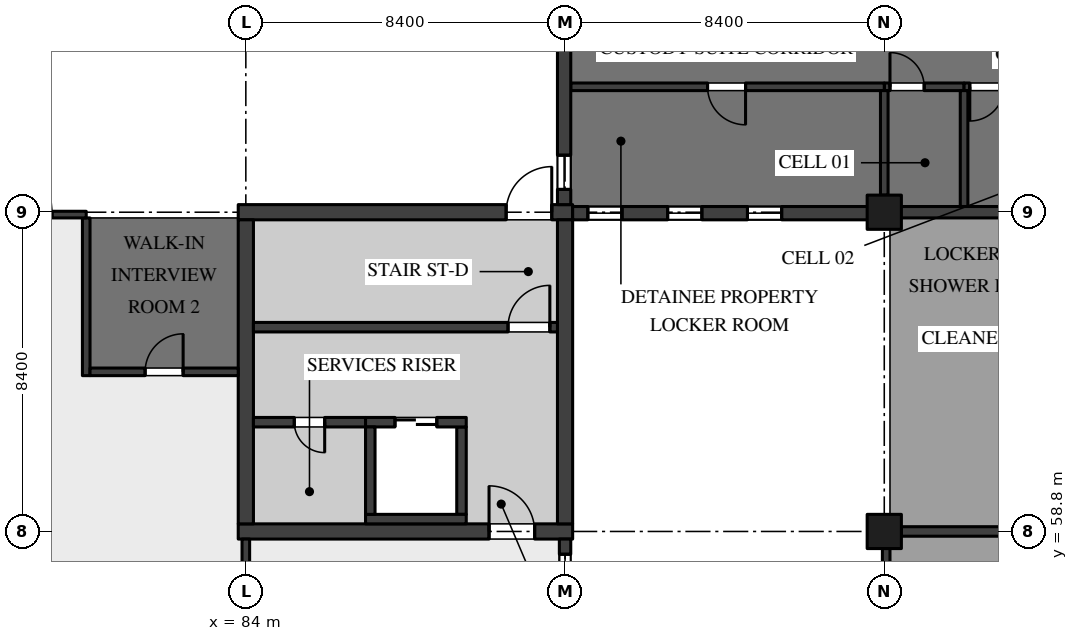
"""IFC4 building model, lengths in metres.
Left out: names, types, materials, properties, quantities, classifications, styles, units other than length and angle.
Written with IfcOpenShell. Run it as: python <this file> out.ifc"""

import sys

from ifc_helpers import new_model, si_unit, direction, frame, frame_2d, origin, origin_2d, place, context, subcontext, project, spatial, rectangle, extrude, element, fill, save


model = new_model("IFC4")
c1 = context("Model", 3, precision=1e-05, world=origin(), true_north=direction((0.0, 1.0)))
c2 = subcontext(c1, "Body", "Model", "MODEL_VIEW")
j1 = project(units=[si_unit("LENGTHUNIT", "METRE"), si_unit("PLANEANGLEUNIT", "RADIAN")], contexts=[c1])
p1 = place(None, origin())
s1 = spatial("IfcSite", under=j1, at=p1, CompositionType="ELEMENT")
p2 = place(p1, origin())
s2 = spatial("IfcBuilding", under=s1, at=p2, CompositionType="ELEMENT")
p3 = place(p2, origin())
s3 = spatial("IfcBuildingStorey", under=s2, at=p3, CompositionType="ELEMENT", Elevation=0.0)
for number, where, z_axis, x_axis in (
    (1, (100.8, 58.8, 0.0), (0.0, 0.0, 1.0), (1.0, 0.0, 0.0)),
    (2, (100.8, 67.2, 0.0), (0.0, 0.0, 1.0), (1.0, 0.0, 0.0)),
):
    element("IfcColumn", number, at=place(p3, frame(where, z_axis=z_axis, x_axis=x_axis)), inside=s3, PredefinedType="COLUMN", context=c2, shape_type="SweptSolid", body=[
        extrude(rectangle(XDim=0.9, YDim=0.9, at=origin_2d()), origin(), (0.0, 0.0, 1.0), 5.05),
    ])
p4 = place(p3, frame((83.8, 58.8, 0.0), z_axis=(0.0, 0.0, 1.0), x_axis=(1.0, 0.0, 0.0)))
e3 = element("IfcWall", 3, at=p4, inside=s3, PredefinedType="SHEAR", context=c2, shape_type="SweptSolid", body=[
    extrude(rectangle(XDim=8.8, YDim=0.4, at=frame_2d((4.4, 0.0))), origin(), (0.0, 0.0, 1.0), 5.05),
])
p5 = place(p4, frame((6.6, 0.0, 0.0)))
e4 = element("IfcOpeningElement", 4, at=p5, cuts=e3, PredefinedType="OPENING", context=c2, shape_type="SweptSolid", body=[
    extrude(rectangle(XDim=1.2, YDim=2.1, at=frame_2d((0.6, 1.05))), frame((0.0, 0.21, 0.0), z_axis=(0.0, -1.0, 0.0), x_axis=(1.0, 0.0, 0.0)), (0.0, 0.0, 1.0), 0.42),
])
p6 = place(p3, frame((83.8, 67.2, 0.0), z_axis=(0.0, 0.0, 1.0), x_axis=(1.0, 0.0, 0.0)))
e5 = element("IfcWall", 5, at=p6, inside=s3, PredefinedType="SHEAR", context=c2, shape_type="SweptSolid", body=[
    extrude(rectangle(XDim=8.8, YDim=0.4, at=frame_2d((4.4, 0.0))), origin(), (0.0, 0.0, 1.0), 5.05),
])
p7 = place(p6, frame((7.05, 0.0, 0.0)))
e6 = element("IfcOpeningElement", 6, at=p7, cuts=e5, PredefinedType="OPENING", context=c2, shape_type="SweptSolid", body=[
    extrude(rectangle(XDim=1.2, YDim=2.1, at=frame_2d((0.6, 1.05))), frame((0.0, 0.21, 0.0), z_axis=(0.0, -1.0, 0.0), x_axis=(1.0, 0.0, 0.0)), (0.0, 0.0, 1.0), 0.42),
])
for number, where, z_axis, x_axis in (
    (7, (84.0, 59.0, 0.0), (0.0, 0.0, 1.0), (0.0, 1.0, 0.0)),
    (8, (92.4, 59.0, 0.0), (0.0, 0.0, 1.0), (0.0, 1.0, 0.0)),
):
    element("IfcWall", number, at=place(p3, frame(where, z_axis=z_axis, x_axis=x_axis)), inside=s3, PredefinedType="SHEAR", context=c2, shape_type="SweptSolid", body=[
        extrude(rectangle(XDim=8.0, YDim=0.4, at=frame_2d((4.0, 0.0))), origin(), (0.0, 0.0, 1.0), 5.05),
    ])
p8 = place(p3, frame((92.2, 64.175, 0.0), z_axis=(0.0, 0.0, 1.0), x_axis=(-1.0, 0.0, 0.0)))
e9 = element("IfcWall", 9, at=p8, inside=s3, PredefinedType="SOLIDWALL", context=c2, shape_type="SweptSolid", body=[
    extrude(rectangle(XDim=8.0, YDim=0.25, at=frame_2d((4.0, 0.0))), origin(), (0.0, 0.0, 1.0), 5.05),
])
p9 = place(p8, frame((0.2, 0.0, 0.0)))
e10 = element("IfcOpeningElement", 10, at=p9, cuts=e9, PredefinedType="OPENING", context=c2, shape_type="SweptSolid", body=[
    extrude(rectangle(XDim=1.1, YDim=2.1, at=frame_2d((0.55, 1.05))), frame((0.0, 0.135, 0.0), z_axis=(0.0, -1.0, 0.0), x_axis=(1.0, 0.0, 0.0)), (0.0, 0.0, 1.0), 0.27),
])
p10 = place(p3, frame((87.15, 61.675, 0.0), z_axis=(0.0, 0.0, 1.0), x_axis=(-1.0, 0.0, 0.0)))
e11 = element("IfcWall", 11, at=p10, inside=s3, PredefinedType="SOLIDWALL", context=c2, shape_type="SweptSolid", body=[
    extrude(rectangle(XDim=2.95, YDim=0.25, at=frame_2d((1.475, 0.0))), origin(), (0.0, 0.0, 1.0), 5.05),
])
p11 = place(p10, frame((1.075, 0.0, 0.0)))
e12 = element("IfcOpeningElement", 12, at=p11, cuts=e11, PredefinedType="OPENING", context=c2, shape_type="SweptSolid", body=[
    extrude(rectangle(XDim=0.8, YDim=2.1, at=frame_2d((0.4, 1.05))), frame((0.0, 0.135, 0.0), z_axis=(0.0, -1.0, 0.0), x_axis=(1.0, 0.0, 0.0)), (0.0, 0.0, 1.0), 0.27),
])
p12 = place(p3, frame((89.675, 59.25, 0.0), z_axis=(0.0, 0.0, 1.0), x_axis=(0.0, 1.0, 0.0)))
e13 = element("IfcWall", 13, at=p12, inside=s3, PredefinedType="SOLIDWALL", context=c2, shape_type="SweptSolid", body=[
    extrude(rectangle(XDim=2.3, YDim=0.25, at=frame_2d((1.15, 0.0))), origin(), (0.0, 0.0, 1.0), 5.05),
])
p13 = place(p3, frame((87.15, 61.675, 0.0), z_axis=(0.0, 0.0, 1.0), x_axis=(1.0, 0.0, 0.0)))
e14 = element("IfcWall", 14, at=p13, inside=s3, PredefinedType="SOLIDWALL", context=c2, shape_type="SweptSolid", body=[
    extrude(rectangle(XDim=2.65, YDim=0.25, at=frame_2d((1.325, 0.0))), origin(), (0.0, 0.0, 1.0), 5.05),
])
p14 = place(p13, frame((0.775, 0.0, 0.0)))
e15 = element("IfcOpeningElement", 15, at=p14, cuts=e14, PredefinedType="OPENING", context=c2, shape_type="SweptSolid", body=[
    extrude(rectangle(XDim=1.1, YDim=2.1, at=frame_2d((0.55, 1.05))), frame((0.0, 0.135, 0.0), z_axis=(0.0, -1.0, 0.0), x_axis=(1.0, 0.0, 0.0)), (0.0, 0.0, 1.0), 0.27),
])
p15 = place(p3, frame((87.15, 59.125, 0.0), z_axis=(0.0, 0.0, 1.0), x_axis=(1.0, 0.0, 0.0)))
e16 = element("IfcWall", 16, at=p15, inside=s3, PredefinedType="SOLIDWALL", context=c2, shape_type="SweptSolid", body=[
    extrude(rectangle(XDim=2.65, YDim=0.25, at=frame_2d((1.325, 0.0))), origin(), (0.0, 0.0, 1.0), 5.05),
])
p16 = place(p3, frame((87.275, 59.25, 0.0), z_axis=(0.0, 0.0, 1.0), x_axis=(0.0, 1.0, 0.0)))
e17 = element("IfcWall", 17, at=p16, inside=s3, PredefinedType="SOLIDWALL", context=c2, shape_type="SweptSolid", body=[
    extrude(rectangle(XDim=2.3, YDim=0.25, at=frame_2d((1.15, 0.0))), origin(), (0.0, 0.0, 1.0), 5.05),
])
p17 = place(p3, frame((84.0, 54.6, 0.0), z_axis=(0.0, 0.0, 1.0), x_axis=(0.0, 1.0, 0.0)))
e18 = element("IfcWall", 18, at=p17, inside=s3, PredefinedType="PARTITIONING", context=c2, shape_type="SweptSolid", body=[
    extrude(rectangle(XDim=4.0, YDim=0.2, at=frame_2d((2.0, 0.0))), origin(), (0.0, 0.0, 1.0), 18.77),
])
p18 = place(p17, frame((1.5, 0.0, 0.0)))
e19 = element("IfcOpeningElement", 19, at=p18, cuts=e18, PredefinedType="OPENING", context=c2, shape_type="SweptSolid", body=[
    extrude(rectangle(XDim=1.0, YDim=2.4, at=frame_2d((0.5, 1.2))), frame((0.0, 0.11, 0.0), z_axis=(0.0, -1.0, 0.0), x_axis=(1.0, 0.0, 0.0)), (0.0, 0.0, 1.0), 0.22),
])
p19 = place(p3, frame((79.8, 62.9, 0.0), z_axis=(0.0, 0.0, 1.0), x_axis=(0.0, 1.0, 0.0)))
e20 = element("IfcWall", 20, at=p19, inside=s3, PredefinedType="PARTITIONING", context=c2, shape_type="SweptSolid", body=[
    extrude(rectangle(XDim=4.15, YDim=0.2, at=frame_2d((2.075, 0.0))), origin(), (0.0, 0.0, 1.0), 18.591),
])
p20 = place(p3, frame((79.9, 63.0, 0.0), z_axis=(0.0, 0.0, 1.0), x_axis=(1.0, 0.0, 0.0)))
e21 = element("IfcWall", 21, at=p20, inside=s3, PredefinedType="PARTITIONING", context=c2, shape_type="SweptSolid", body=[
    extrude(rectangle(XDim=3.9, YDim=0.2, at=frame_2d((1.95, 0.0))), origin(), (0.0, 0.0, 1.0), 18.77),
])
p21 = place(p20, frame((1.45, 0.0, 0.0)))
e22 = element("IfcOpeningElement", 22, at=p21, cuts=e21, PredefinedType="OPENING", context=c2, shape_type="SweptSolid", body=[
    extrude(rectangle(XDim=1.0, YDim=2.1, at=frame_2d((0.5, 1.05))), frame((0.0, 0.11, 0.0), z_axis=(0.0, -1.0, 0.0), x_axis=(1.0, 0.0, 0.0)), (0.0, 0.0, 1.0), 0.22),
])
p22 = place(p3, frame((101.25, 58.8, 0.0), z_axis=(0.0, 0.0, 1.0), x_axis=(1.0, 0.0, 0.0)))
e23 = element("IfcWall", 23, at=p22, inside=s3, PredefinedType="PARTITIONING", context=c2, shape_type="SweptSolid", body=[
    extrude(rectangle(XDim=6.025, YDim=0.25, at=frame_2d((3.012, 0.0))), origin(), (0.0, 0.0, 1.0), 5.05),
])
p23 = place(p3, frame((100.8, 70.5, 0.0), z_axis=(0.0, 0.0, 1.0), x_axis=(1.0, 0.0, 0.0)))
e24 = element("IfcWall", 24, at=p23, inside=s3, PredefinedType="PARTITIONING", context=c2, shape_type="SweptSolid", body=[
    extrude(rectangle(XDim=2.1, YDim=0.2, at=frame_2d((1.05, 0.0))), origin(), (0.0, 0.0, 1.0), 5.05),
])
p24 = place(p23, frame((0.15, 0.0, 0.0)))
e25 = element("IfcOpeningElement", 25, at=p24, cuts=e24, PredefinedType="OPENING", context=c2, shape_type="SweptSolid", body=[
    extrude(rectangle(XDim=0.9, YDim=2.1, at=frame_2d((0.45, 1.05))), frame((0.0, 0.11, 0.0), z_axis=(0.0, -1.0, 0.0), x_axis=(1.0, 0.0, 0.0)), (0.0, 0.0, 1.0), 0.22),
])
p25 = place(p3, frame((102.9, 70.5, 0.0), z_axis=(0.0, 0.0, 1.0), x_axis=(1.0, 0.0, 0.0)))
e26 = element("IfcWall", 26, at=p25, inside=s3, PredefinedType="PARTITIONING", context=c2, shape_type="SweptSolid", body=[
    extrude(rectangle(XDim=2.1, YDim=0.2, at=frame_2d((1.05, 0.0))), origin(), (0.0, 0.0, 1.0), 5.05),
])
p26 = place(p25, frame((0.15, 0.0, 0.0)))
e27 = element("IfcOpeningElement", 27, at=p26, cuts=e26, PredefinedType="OPENING", context=c2, shape_type="SweptSolid", body=[
    extrude(rectangle(XDim=0.9, YDim=2.1, at=frame_2d((0.45, 1.05))), frame((0.0, 0.11, 0.0), z_axis=(0.0, -1.0, 0.0), x_axis=(1.0, 0.0, 0.0)), (0.0, 0.0, 1.0), 0.22),
])
p27 = place(p3, frame((92.55, 70.5, 0.0), z_axis=(0.0, 0.0, 1.0), x_axis=(1.0, 0.0, 0.0)))
e28 = element("IfcWall", 28, at=p27, inside=s3, PredefinedType="PARTITIONING", context=c2, shape_type="SweptSolid", body=[
    extrude(rectangle(XDim=8.25, YDim=0.2, at=frame_2d((4.125, 0.0))), origin(), (0.0, 0.0, 1.0), 5.05),
])
p28 = place(p27, frame((3.6, 0.0, 0.0)))
e29 = element("IfcOpeningElement", 29, at=p28, cuts=e28, PredefinedType="OPENING", context=c2, shape_type="SweptSolid", body=[
    extrude(rectangle(XDim=1.0, YDim=2.1, at=frame_2d((0.5, 1.05))), frame((0.0, 0.11, 0.0), z_axis=(0.0, -1.0, 0.0), x_axis=(1.0, 0.0, 0.0)), (0.0, 0.0, 1.0), 0.22),
])
p29 = place(p3, frame((102.9, 67.35, 0.0), z_axis=(0.0, 0.0, 1.0), x_axis=(0.0, 1.0, 0.0)))
e30 = element("IfcWall", 30, at=p29, inside=s3, PredefinedType="PARTITIONING", context=c2, shape_type="SweptSolid", body=[
    extrude(rectangle(XDim=3.05, YDim=0.2, at=frame_2d((1.525, 0.0))), origin(), (0.0, 0.0, 1.0), 5.05),
])
p30 = place(p3, frame((100.8, 67.65, 0.0), z_axis=(0.0, 0.0, 1.0), x_axis=(0.0, 1.0, 0.0)))
e31 = element("IfcWall", 31, at=p30, inside=s3, PredefinedType="PARTITIONING", context=c2, shape_type="SweptSolid", body=[
    extrude(rectangle(XDim=2.75, YDim=0.2, at=frame_2d((1.375, 0.0))), origin(), (0.0, 0.0, 1.0), 5.05),
])
p31 = place(p3, frame((92.375, 75.4, 0.0), z_axis=(0.0, 0.0, 1.0), x_axis=(0.0, -1.0, 0.0)))
e32 = element("IfcWall", 32, at=p31, inside=s3, PredefinedType="SOLIDWALL", context=c2, shape_type="SweptSolid", body=[
    extrude(rectangle(XDim=8.0, YDim=0.35, at=frame_2d((4.0, 0.0))), origin(), (0.0, 0.0, 1.0), 5.05),
])
p32 = place(p31, frame((6.7, 0.0, 1.5)))
e33 = element("IfcOpeningElement", 33, at=p32, cuts=e32, PredefinedType="OPENING", context=c2, shape_type="SweptSolid", body=[
    extrude(rectangle(XDim=0.9, YDim=1.2, at=frame_2d((0.45, 0.6))), frame((0.0, 0.185, 0.0), z_axis=(0.0, -1.0, 0.0), x_axis=(1.0, 0.0, 0.0)), (0.0, 0.0, 1.0), 0.37),
])
p33 = place(p3, frame((92.6, 67.175, 0.0), z_axis=(0.0, 0.0, 1.0), x_axis=(1.0, 0.0, 0.0)))
e34 = element("IfcWall", 34, at=p33, inside=s3, PredefinedType="SOLIDWALL", context=c2, shape_type="SweptSolid", body=[
    extrude(rectangle(XDim=7.77, YDim=0.35, at=frame_2d((3.885, 0.0))), origin(), (0.0, 0.0, 1.0), 5.05),
])
p34 = place(p33, frame((0.4, 0.0, 1.5)))
e35 = element("IfcOpeningElement", 35, at=p34, cuts=e34, PredefinedType="OPENING", context=c2, shape_type="SweptSolid", body=[
    extrude(rectangle(XDim=0.9, YDim=1.2, at=frame_2d((0.45, 0.6))), frame((0.0, 0.185, 0.0), z_axis=(0.0, -1.0, 0.0), x_axis=(1.0, 0.0, 0.0)), (0.0, 0.0, 1.0), 0.37),
])
p35 = place(p33, frame((2.5, 0.0, 1.5)))
e36 = element("IfcOpeningElement", 36, at=p35, cuts=e34, PredefinedType="OPENING", context=c2, shape_type="SweptSolid", body=[
    extrude(rectangle(XDim=0.9, YDim=1.2, at=frame_2d((0.45, 0.6))), frame((0.0, 0.185, 0.0), z_axis=(0.0, -1.0, 0.0), x_axis=(1.0, 0.0, 0.0)), (0.0, 0.0, 1.0), 0.37),
])
p36 = place(p33, frame((4.6, 0.0, 1.5)))
e37 = element("IfcOpeningElement", 37, at=p36, cuts=e34, PredefinedType="OPENING", context=c2, shape_type="SweptSolid", body=[
    extrude(rectangle(XDim=0.9, YDim=1.2, at=frame_2d((0.45, 0.6))), frame((0.0, 0.185, 0.0), z_axis=(0.0, -1.0, 0.0), x_axis=(1.0, 0.0, 0.0)), (0.0, 0.0, 1.0), 0.37),
])
p37 = place(p3, frame((100.85, 58.37, 0.0), z_axis=(0.0, 0.0, 1.0), x_axis=(0.0, -1.0, 0.0)))
e38 = element("IfcWall", 38, at=p37, inside=s3, PredefinedType="SOLIDWALL", context=c2, shape_type="SweptSolid", body=[
    extrude(rectangle(XDim=3.07, YDim=0.2, at=frame_2d((1.535, 0.0))), origin(), (0.0, 0.0, 1.0), 5.05),
])
p38 = place(p37, frame((1.17, 0.0, 0.0)))
e39 = element("IfcOpeningElement", 39, at=p38, cuts=e38, PredefinedType="OPENING", context=c2, shape_type="SweptSolid", body=[
    extrude(rectangle(XDim=1.0, YDim=2.4, at=frame_2d((0.5, 1.2))), frame((0.0, 0.11, 0.0), z_axis=(0.0, -1.0, 0.0), x_axis=(1.0, 0.0, 0.0)), (0.0, 0.0, 1.0), 0.22),
])
p39 = place(p3, frame((79.8, 67.137, 0.0), z_axis=(0.0, 0.0, 1.0), x_axis=(-1.0, 0.0, 0.0)))
e40 = element("IfcWall", 40, at=p39, inside=s3, PredefinedType="SOLIDWALL", context=c2, shape_type="SweptSolid", body=[
    extrude(rectangle(XDim=3.87, YDim=0.175, at=frame_2d((1.935, 0.0))), origin(), (0.0, 0.0, 1.0), 5.4),
])
p40 = place(p39, frame((0.9, 0.0, 0.0)))
e41 = element("IfcOpeningElement", 41, at=p40, cuts=e40, PredefinedType="OPENING", context=c2, shape_type="SweptSolid", body=[
    extrude(rectangle(XDim=2.4, YDim=2.7, at=frame_2d((1.2, 1.35))), frame((0.0, 0.098, 0.0), z_axis=(0.0, -1.0, 0.0), x_axis=(1.0, 0.0, 0.0)), (0.0, 0.0, 1.0), 0.195),
])
p41 = place(p3, frame((92.4, 50.73, 0.0), z_axis=(0.0, 0.0, 1.0), x_axis=(0.0, 1.0, 0.0)))
e42 = element("IfcWall", 42, at=p41, inside=s3, PredefinedType="SOLIDWALL", context=c2, shape_type="SweptSolid", body=[
    extrude(rectangle(XDim=7.87, YDim=0.3, at=frame_2d((3.935, 0.0))), origin(), (0.0, 0.0, 1.0), 5.05),
])
p42 = place(p41, frame((1.32, 0.0, 1.5)))
e43 = element("IfcOpeningElement", 43, at=p42, cuts=e42, PredefinedType="OPENING", context=c2, shape_type="SweptSolid", body=[
    extrude(rectangle(XDim=0.9, YDim=1.2, at=frame_2d((0.45, 0.6))), frame((0.0, 0.16, 0.0), z_axis=(0.0, -1.0, 0.0), x_axis=(1.0, 0.0, 0.0)), (0.0, 0.0, 1.0), 0.32),
])
p43 = place(p41, frame((4.47, 0.0, 2.85)))
e44 = element("IfcOpeningElement", 44, at=p43, cuts=e42, PredefinedType="OPENING", context=c2, shape_type="SweptSolid", body=[
    extrude(rectangle(XDim=3.0, YDim=1.2, at=frame_2d((1.5, 0.6))), frame((0.0, 0.16, 0.0), z_axis=(0.0, -1.0, 0.0), x_axis=(1.0, 0.0, 0.0)), (0.0, 0.0, 1.0), 0.32),
])
p44 = place(p3, frame((109.0, 67.2, 0.0), z_axis=(0.0, 0.0, 1.0), x_axis=(-1.0, 0.0, 0.0)))
e45 = element("IfcWall", 45, at=p44, inside=s3, PredefinedType="SOLIDWALL", context=c2, shape_type="SweptSolid", body=[
    extrude(rectangle(XDim=7.77, YDim=0.3, at=frame_2d((3.885, 0.0))), origin(), (0.0, 0.0, 1.0), 5.05),
])
p45 = place(p5, origin())
e46 = element("IfcDoor", 46, at=p45, inside=s3, OperationType="SINGLE_SWING_RIGHT", PredefinedType="DOOR", context=c2, shape_type="SweptSolid", body=[
    extrude(rectangle(XDim=1.2, YDim=2.1, at=frame_2d((0.6, 1.05))), frame((0.0, 0.035, 0.0), z_axis=(0.0, -1.0, 0.0), x_axis=(1.0, 0.0, 0.0)), (0.0, 0.0, 1.0), 0.07),
])
fill(e4, e46)
p46 = place(p11, origin())
e47 = element("IfcDoor", 47, at=p46, inside=s3, OperationType="SINGLE_SWING_RIGHT", PredefinedType="DOOR", context=c2, shape_type="SweptSolid", body=[
    extrude(rectangle(XDim=0.8, YDim=2.1, at=frame_2d((0.4, 1.05))), frame((0.0, 0.035, 0.0), z_axis=(0.0, -1.0, 0.0), x_axis=(1.0, 0.0, 0.0)), (0.0, 0.0, 1.0), 0.07),
])
fill(e12, e47)
p47 = place(p9, frame((1.1, 0.0, 0.0), z_axis=(0.0, 0.0, 1.0), x_axis=(-1.0, 0.0, 0.0)))
e48 = element("IfcDoor", 48, at=p47, inside=s3, OperationType="SINGLE_SWING_LEFT", PredefinedType="DOOR", context=c2, shape_type="SweptSolid", body=[
    extrude(rectangle(XDim=1.1, YDim=2.1, at=frame_2d((0.55, 1.05))), frame((0.0, 0.035, 0.0), z_axis=(0.0, -1.0, 0.0), x_axis=(1.0, 0.0, 0.0)), (0.0, 0.0, 1.0), 0.07),
])
fill(e10, e48)
p48 = place(p7, origin())
e49 = element("IfcDoor", 49, at=p48, inside=s3, OperationType="SINGLE_SWING_LEFT", PredefinedType="DOOR", context=c2, shape_type="SweptSolid", body=[
    extrude(rectangle(XDim=1.2, YDim=2.1, at=frame_2d((0.6, 1.05))), frame((0.0, 0.035, 0.0), z_axis=(0.0, -1.0, 0.0), x_axis=(1.0, 0.0, 0.0)), (0.0, 0.0, 1.0), 0.07),
])
fill(e6, e49)
p49 = place(p14, origin())
e50 = element("IfcDoor", 50, at=p49, inside=s3, OperationType="DOUBLE_DOOR_SLIDING", PredefinedType="DOOR", context=c2, shape_type="SweptSolid", body=[
    extrude(rectangle(XDim=1.1, YDim=2.1, at=frame_2d((0.55, 1.05))), frame((0.0, 0.04, 0.0), z_axis=(0.0, -1.0, 0.0), x_axis=(1.0, 0.0, 0.0)), (0.0, 0.0, 1.0), 0.08),
])
fill(e15, e50)
p50 = place(p21, origin())
e51 = element("IfcDoor", 51, at=p50, inside=s3, OperationType="SINGLE_SWING_LEFT", PredefinedType="DOOR", context=c2, shape_type="SweptSolid", body=[
    extrude(rectangle(XDim=1.0, YDim=2.1, at=frame_2d((0.5, 1.05))), frame((0.0, 0.045, 0.0), z_axis=(0.0, -1.0, 0.0), x_axis=(1.0, 0.0, 0.0)), (0.0, 0.0, 1.0), 0.09),
])
fill(e22, e51)
p51 = place(p24, origin())
e52 = element("IfcDoor", 52, at=p51, inside=s3, OperationType="SINGLE_SWING_RIGHT", PredefinedType="DOOR", context=c2, shape_type="SweptSolid", body=[
    extrude(rectangle(XDim=0.9, YDim=2.1, at=frame_2d((0.45, 1.05))), frame((0.0, 0.04, 0.0), z_axis=(0.0, -1.0, 0.0), x_axis=(1.0, 0.0, 0.0)), (0.0, 0.0, 1.0), 0.08),
])
fill(e25, e52)
p52 = place(p26, frame((0.9, 0.0, 0.0), z_axis=(0.0, 0.0, 1.0), x_axis=(-1.0, 0.0, 0.0)))
e53 = element("IfcDoor", 53, at=p52, inside=s3, OperationType="SINGLE_SWING_LEFT", PredefinedType="DOOR", context=c2, shape_type="SweptSolid", body=[
    extrude(rectangle(XDim=0.9, YDim=2.1, at=frame_2d((0.45, 1.05))), frame((0.0, 0.04, 0.0), z_axis=(0.0, -1.0, 0.0), x_axis=(1.0, 0.0, 0.0)), (0.0, 0.0, 1.0), 0.08),
])
fill(e27, e53)
p53 = place(p28, frame((1.0, 0.0, 0.0), z_axis=(0.0, 0.0, 1.0), x_axis=(-1.0, 0.0, 0.0)))
e54 = element("IfcDoor", 54, at=p53, inside=s3, OperationType="SINGLE_SWING_RIGHT", PredefinedType="DOOR", context=c2, shape_type="SweptSolid", body=[
    extrude(rectangle(XDim=1.0, YDim=2.1, at=frame_2d((0.5, 1.05))), frame((0.0, 0.045, 0.0), z_axis=(0.0, -1.0, 0.0), x_axis=(1.0, 0.0, 0.0)), (0.0, 0.0, 1.0), 0.09),
])
fill(e29, e54)
p54 = place(p32, origin())
e55 = element("IfcWindow", 55, at=p54, inside=s3, PartitioningType="SINGLE_PANEL", PredefinedType="WINDOW", context=c2, shape_type="SweptSolid", body=[
    extrude(rectangle(XDim=0.9, YDim=1.2, at=frame_2d((0.45, 0.6))), frame((0.0, 0.05, 0.0), z_axis=(0.0, -1.0, 0.0), x_axis=(1.0, 0.0, 0.0)), (0.0, 0.0, 1.0), 0.1),
])
fill(e33, e55)
p55 = place(p34, origin())
e56 = element("IfcWindow", 56, at=p55, inside=s3, PartitioningType="SINGLE_PANEL", PredefinedType="WINDOW", context=c2, shape_type="SweptSolid", body=[
    extrude(rectangle(XDim=0.9, YDim=1.2, at=frame_2d((0.45, 0.6))), frame((0.0, 0.05, 0.0), z_axis=(0.0, -1.0, 0.0), x_axis=(1.0, 0.0, 0.0)), (0.0, 0.0, 1.0), 0.1),
])
fill(e35, e56)
p56 = place(p35, origin())
e57 = element("IfcWindow", 57, at=p56, inside=s3, PartitioningType="SINGLE_PANEL", PredefinedType="WINDOW", context=c2, shape_type="SweptSolid", body=[
    extrude(rectangle(XDim=0.9, YDim=1.2, at=frame_2d((0.45, 0.6))), frame((0.0, 0.05, 0.0), z_axis=(0.0, -1.0, 0.0), x_axis=(1.0, 0.0, 0.0)), (0.0, 0.0, 1.0), 0.1),
])
fill(e36, e57)
p57 = place(p36, origin())
e58 = element("IfcWindow", 58, at=p57, inside=s3, PartitioningType="SINGLE_PANEL", PredefinedType="WINDOW", context=c2, shape_type="SweptSolid", body=[
    extrude(rectangle(XDim=0.9, YDim=1.2, at=frame_2d((0.45, 0.6))), frame((0.0, 0.05, 0.0), z_axis=(0.0, -1.0, 0.0), x_axis=(1.0, 0.0, 0.0)), (0.0, 0.0, 1.0), 0.1),
])
fill(e37, e58)
p58 = place(p40, frame((2.4, 0.0, 0.0), z_axis=(0.0, 0.0, 1.0), x_axis=(-1.0, 0.0, 0.0)))
e59 = element("IfcDoor", 59, at=p58, inside=s3, OperationType="SINGLE_SWING_RIGHT", PredefinedType="DOOR", context=c2, shape_type="SweptSolid", body=[
    extrude(rectangle(XDim=2.4, YDim=2.7, at=frame_2d((1.2, 1.35))), frame((0.0, 0.025, 0.0), z_axis=(0.0, -1.0, 0.0), x_axis=(1.0, 0.0, 0.0)), (0.0, 0.0, 1.0), 0.05),
])
fill(e41, e59)
p59 = place(p43, origin())
e60 = element("IfcWindow", 60, at=p59, inside=s3, PartitioningType="SINGLE_PANEL", PredefinedType="WINDOW", context=c2, shape_type="SweptSolid", body=[
    extrude(rectangle(XDim=3.0, YDim=1.2, at=frame_2d((1.5, 0.6))), frame((0.0, 0.05, 0.0), z_axis=(0.0, -1.0, 0.0), x_axis=(1.0, 0.0, 0.0)), (0.0, 0.0, 1.0), 0.1),
])
fill(e44, e60)
save(model, sys.argv[1])
